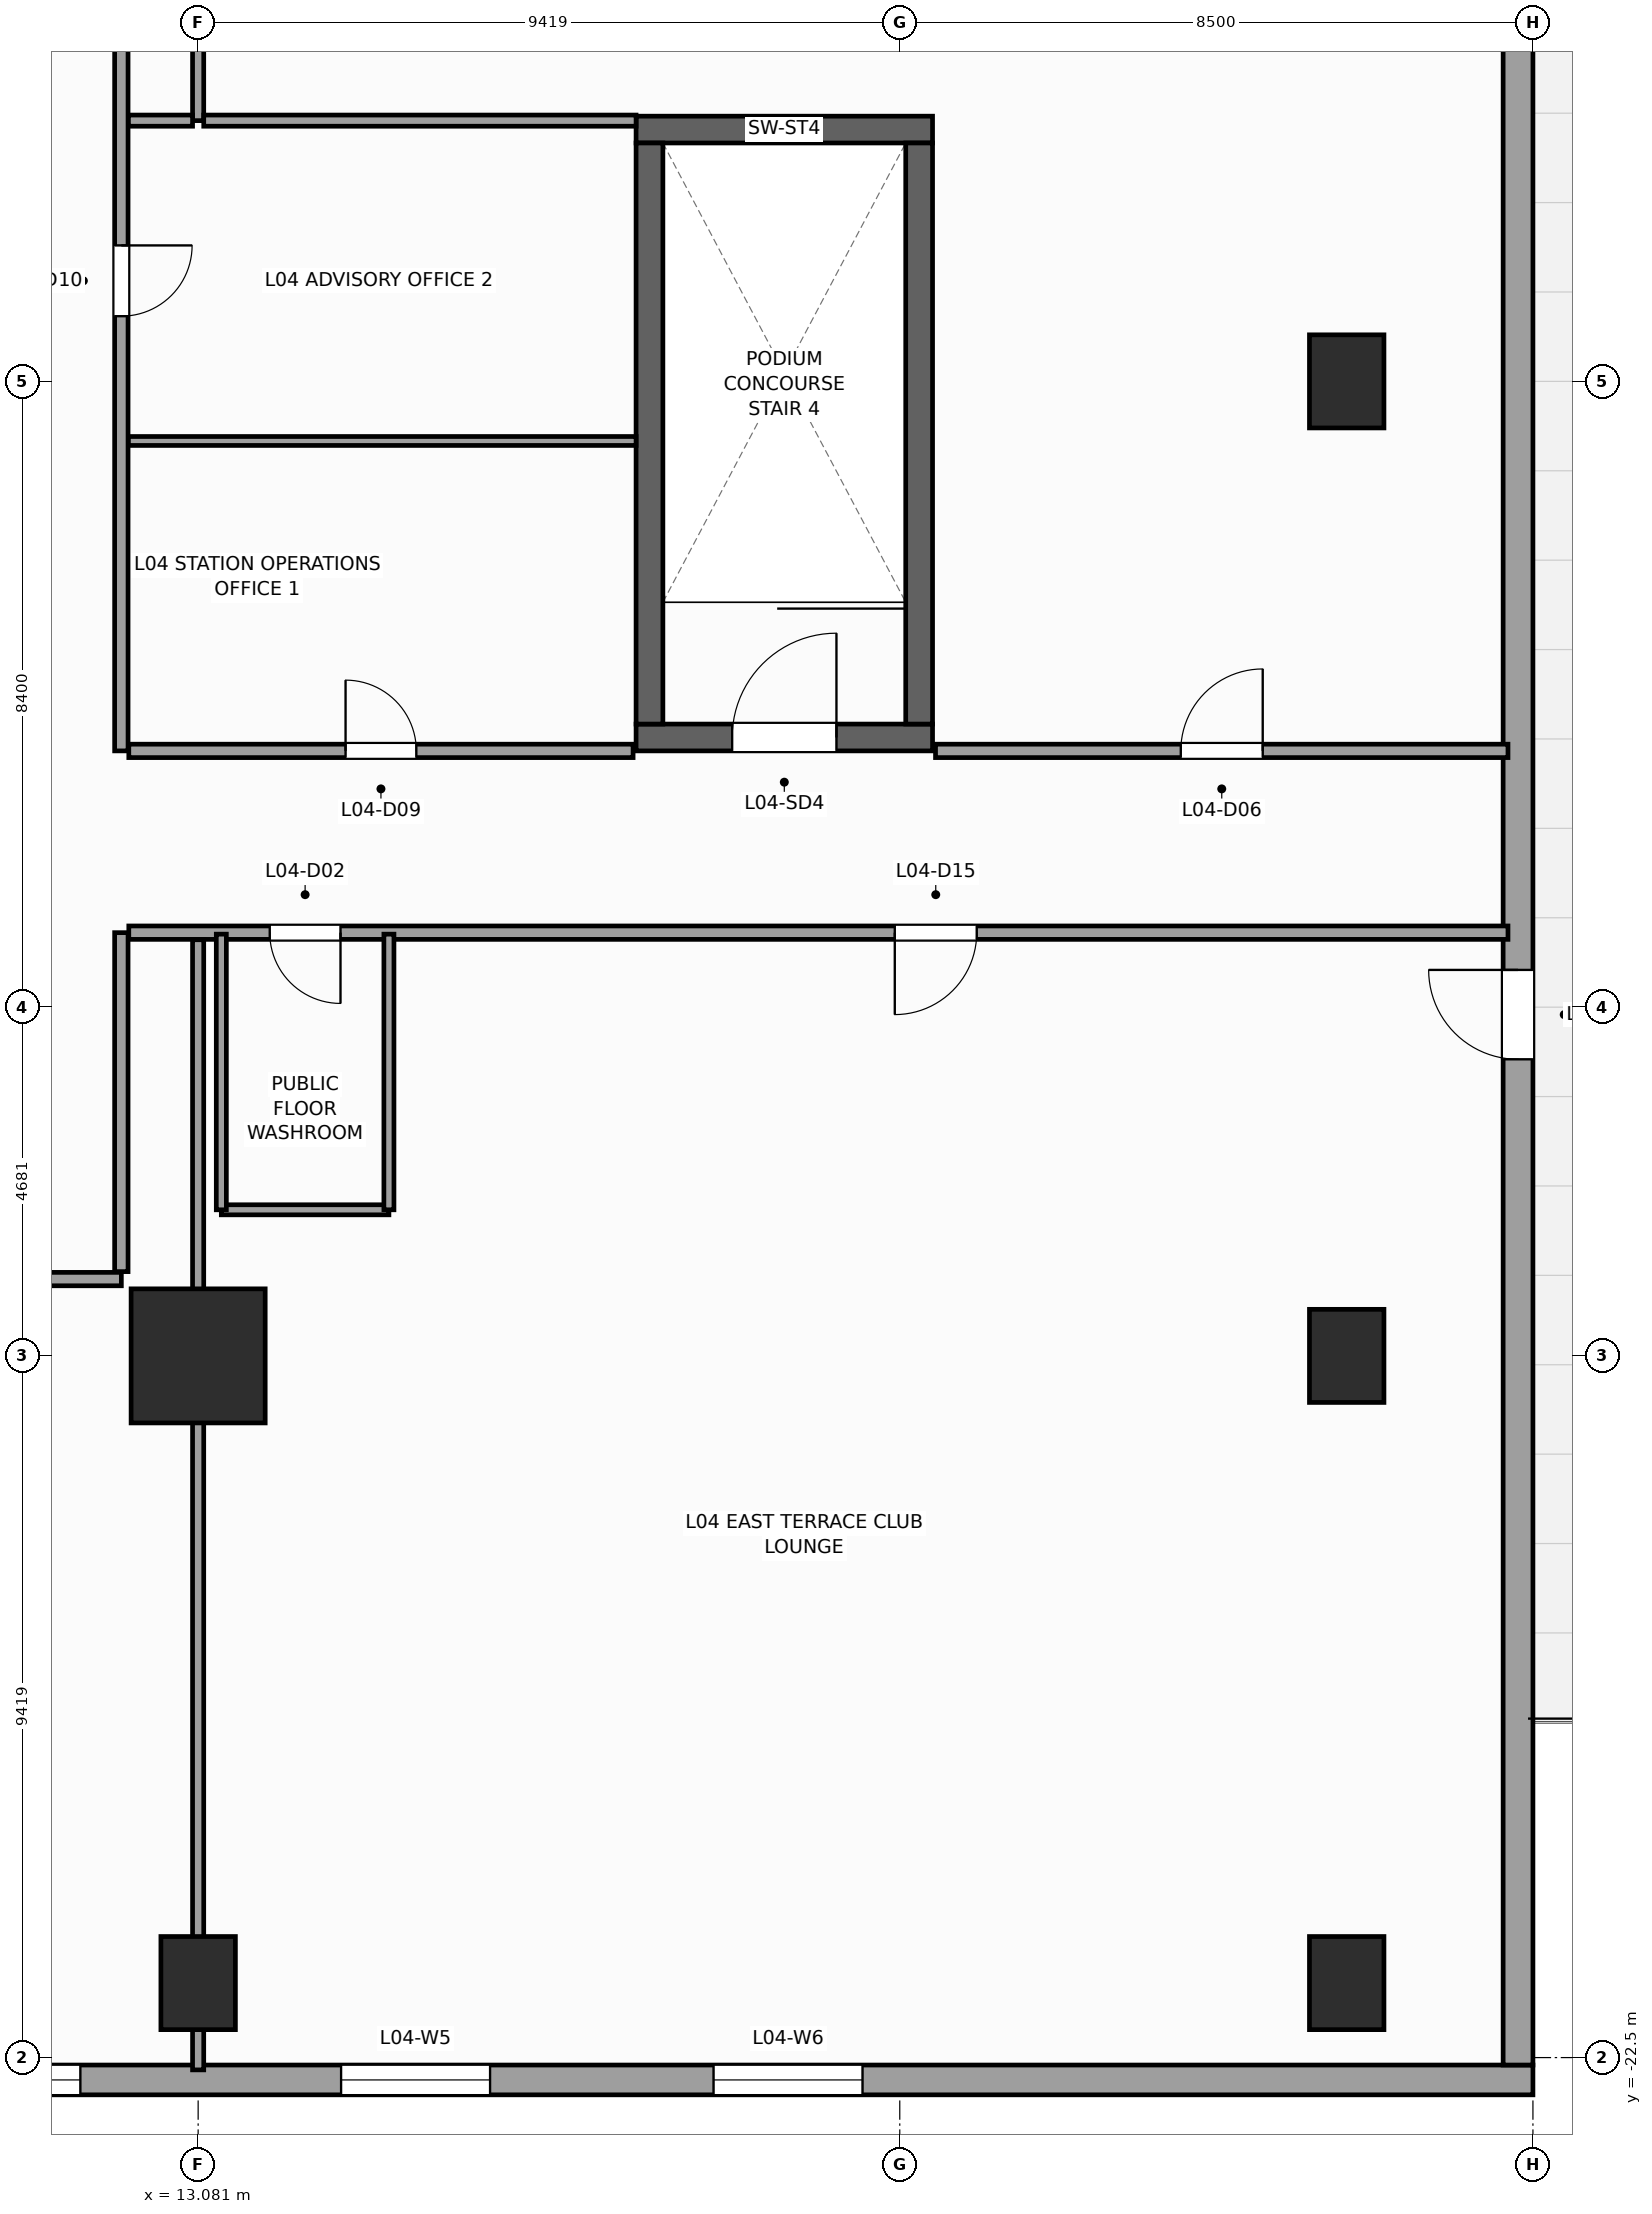
"""IFC4 building model, lengths in metres.
Left out: names, types, materials, properties, quantities, classifications, styles, units other than length and angle.
Written with IfcOpenShell. Run it as: python <this file> out.ifc"""

import sys

from ifc_helpers import new_model, si_unit, direction, frame, frame_2d, origin, origin_2d, place, context, subcontext, project, spatial, rectangle, extrude, source, transform, mapped, element, fill, save


model = new_model("IFC4")
c1 = context("Model", 3, precision=1e-05, world=origin(), true_north=direction((0.0, 1.0)))
c2 = subcontext(c1, "Body", "Model", "MODEL_VIEW")
j1 = project(units=[si_unit("LENGTHUNIT", "METRE"), si_unit("PLANEANGLEUNIT", "RADIAN")], contexts=[c1])
p1 = place(None, origin())
s1 = spatial("IfcSite", under=j1, at=p1, CompositionType="ELEMENT")
p2 = place(p1, origin())
s2 = spatial("IfcBuilding", under=s1, at=p2, CompositionType="ELEMENT")
p3 = place(p2, frame((0.0, 0.0, 21.0)))
s3 = spatial("IfcBuildingStorey", under=s2, at=p3, CompositionType="ELEMENT", Elevation=21.0)
p4 = place(p3, frame((18.96, -4.78, 0.0), z_axis=(0.0, 0.0, 1.0), x_axis=(1.0, 0.0, 0.0)))
e1 = element("IfcWall", 1, at=p4, inside=s3, PredefinedType="SHEAR", context=c2, shape_type="SweptSolid", body=[
    extrude(rectangle(XDim=3.98, YDim=0.36, at=frame_2d((1.99, 0.0))), origin(), (0.0, 0.0, 1.0), 5.0),
])
p5 = place(p4, frame((1.29, 0.0, 0.0)))
e2 = element("IfcOpeningElement", 2, at=p5, cuts=e1, PredefinedType="OPENING", context=c2, shape_type="SweptSolid", body=[
    extrude(rectangle(XDim=1.4, YDim=2.2, at=frame_2d((0.7, 1.1))), frame((0.0, 0.19, 0.0), z_axis=(0.0, -1.0, 0.0), x_axis=(1.0, 0.0, 0.0)), (0.0, 0.0, 1.0), 0.38),
])
p6 = place(p3, frame((18.96, 3.38, 0.0), z_axis=(0.0, 0.0, 1.0), x_axis=(1.0, 0.0, 0.0)))
e3 = element("IfcWall", 3, at=p6, inside=s3, PredefinedType="SHEAR", context=c2, shape_type="SweptSolid", body=[
    extrude(rectangle(XDim=3.98, YDim=0.36, at=frame_2d((1.99, 0.0))), origin(), (0.0, 0.0, 1.0), 5.0),
])
for number, where, z_axis, x_axis in (
    (4, (19.14, -4.6, 0.0), (0.0, 0.0, 1.0), (0.0, 1.0, 0.0)),
    (5, (22.76, -4.6, 0.0), (0.0, 0.0, 1.0), (0.0, 1.0, 0.0)),
):
    element("IfcWall", number, at=place(p3, frame(where, z_axis=z_axis, x_axis=x_axis)), inside=s3, PredefinedType="SHEAR", context=c2, shape_type="SweptSolid", body=[
        extrude(rectangle(XDim=7.8, YDim=0.36, at=frame_2d((3.9, 0.0))), origin(), (0.0, 0.0, 1.0), 5.0),
    ])
m1 = source(origin(), c2, "Body", "SweptSolid", [
    extrude(rectangle(XDim=1.8, YDim=1.8, at=origin_2d()), origin(), (0.0, 0.0, 1.0), 5.0),
])
p7 = place(p3, frame((13.081, -13.081, 0.0), z_axis=(0.0, 0.0, 1.0), x_axis=(1.0, 0.0, 0.0)))
e6 = element("IfcColumn", 6, at=p7, inside=s3, PredefinedType="COLUMN", context=c2, shape_type="MappedRepresentation", body=[
    mapped(m1, transform((0.0, 0.0, 0.0), scale=1.0)),
])
m2 = source(origin(), c2, "Body", "SweptSolid", [
    extrude(rectangle(XDim=1.0, YDim=1.25, at=origin_2d()), origin(), (0.0, 0.0, 1.0), 5.0),
])
for number, where, z_axis, x_axis in (
    (7, (13.081, -21.5, 0.0), (0.0, 0.0, 1.0), (1.0, 0.0, 0.0)),
    (8, (28.5, -21.5, 0.0), (0.0, 0.0, 1.0), (1.0, 0.0, 0.0)),
    (9, (28.5, -13.081, 0.0), (0.0, 0.0, 1.0), (1.0, 0.0, 0.0)),
    (10, (28.5, 0.0, 0.0), (0.0, 0.0, 1.0), (1.0, 0.0, 0.0)),
):
    element("IfcColumn", number, at=place(p3, frame(where, z_axis=z_axis, x_axis=x_axis)), inside=s3, PredefinedType="COLUMN", context=c2, shape_type="MappedRepresentation", body=[
        mapped(m2, transform((0.0, 0.0, 0.0), scale=1.0)),
    ])
p8 = place(p3, frame((0.0, -22.8, 0.0), z_axis=(0.0, 0.0, 1.0), x_axis=(1.0, 0.0, 0.0)))
e11 = element("IfcWall", 11, at=p8, inside=s3, PredefinedType="STANDARD", context=c2, shape_type="SweptSolid", body=[
    extrude(rectangle(XDim=31.0, YDim=0.4, at=frame_2d((15.5, 0.0))), origin(), (0.0, 0.0, 1.0), 4.72),
])
p9 = place(p8, frame((9.5, 0.0, 0.65)))
e12 = element("IfcOpeningElement", 12, at=p9, cuts=e11, PredefinedType="OPENING", context=c2, shape_type="SweptSolid", body=[
    extrude(rectangle(XDim=2.0, YDim=1.45, at=frame_2d((1.0, 0.725))), frame((0.0, 0.21, 0.0), z_axis=(0.0, -1.0, 0.0), x_axis=(1.0, 0.0, 0.0)), (0.0, 0.0, 1.0), 0.42),
])
p10 = place(p8, frame((15.0, 0.0, 0.65)))
e13 = element("IfcOpeningElement", 13, at=p10, cuts=e11, PredefinedType="OPENING", context=c2, shape_type="SweptSolid", body=[
    extrude(rectangle(XDim=2.0, YDim=1.45, at=frame_2d((1.0, 0.725))), frame((0.0, 0.21, 0.0), z_axis=(0.0, -1.0, 0.0), x_axis=(1.0, 0.0, 0.0)), (0.0, 0.0, 1.0), 0.42),
])
p11 = place(p8, frame((20.0, 0.0, 0.65)))
e14 = element("IfcOpeningElement", 14, at=p11, cuts=e11, PredefinedType="OPENING", context=c2, shape_type="SweptSolid", body=[
    extrude(rectangle(XDim=2.0, YDim=1.45, at=frame_2d((1.0, 0.725))), frame((0.0, 0.21, 0.0), z_axis=(0.0, -1.0, 0.0), x_axis=(1.0, 0.0, 0.0)), (0.0, 0.0, 1.0), 0.42),
])
p12 = place(p3, frame((30.8, -22.6, 0.0), z_axis=(0.0, 0.0, 1.0), x_axis=(0.0, 1.0, 0.0)))
e15 = element("IfcWall", 15, at=p12, inside=s3, PredefinedType="STANDARD", context=c2, shape_type="SweptSolid", body=[
    extrude(rectangle(XDim=45.2, YDim=0.4, at=frame_2d((22.6, 0.0))), origin(), (0.0, 0.0, 1.0), 4.72),
])
p13 = place(p12, frame((13.5, 0.0, 0.0)))
e16 = element("IfcOpeningElement", 16, at=p13, cuts=e15, PredefinedType="OPENING", context=c2, shape_type="SweptSolid", body=[
    extrude(rectangle(XDim=1.2, YDim=2.3, at=frame_2d((0.6, 1.15))), frame((0.0, 0.21, 0.0), z_axis=(0.0, -1.0, 0.0), x_axis=(1.0, 0.0, 0.0)), (0.0, 0.0, 1.0), 0.42),
])
p14 = place(p3, frame((4.1, -12.05, 0.0), z_axis=(0.0, 0.0, 1.0), x_axis=(1.0, 0.0, 0.0)))
e17 = element("IfcWall", 17, at=p14, inside=s3, PredefinedType="PARTITIONING", context=c2, shape_type="SweptSolid", body=[
    extrude(rectangle(XDim=7.95, YDim=0.18, at=frame_2d((3.975, 0.0))), origin(), (0.0, 0.0, 1.0), 4.72),
])
p15 = place(p3, frame((12.05, -11.95, 0.0), z_axis=(0.0, 0.0, 1.0), x_axis=(0.0, 1.0, 0.0)))
e18 = element("IfcWall", 18, at=p15, inside=s3, PredefinedType="PARTITIONING", context=c2, shape_type="SweptSolid", body=[
    extrude(rectangle(XDim=4.55, YDim=0.18, at=frame_2d((2.275, 0.0))), origin(), (0.0, 0.0, 1.0), 4.72),
])
p16 = place(p3, frame((12.05, -4.96, 0.0), z_axis=(0.0, 0.0, 1.0), x_axis=(0.0, 1.0, 0.0)))
e19 = element("IfcWall", 19, at=p16, inside=s3, PredefinedType="PARTITIONING", context=c2, shape_type="SweptSolid", body=[
    extrude(rectangle(XDim=16.91, YDim=0.18, at=frame_2d((8.455, 0.0))), origin(), (0.0, 0.0, 1.0), 4.72),
])
p17 = place(p16, frame((5.835, 0.0, 0.0)))
e20 = element("IfcOpeningElement", 20, at=p17, cuts=e19, PredefinedType="OPENING", context=c2, shape_type="SweptSolid", body=[
    extrude(rectangle(XDim=0.95, YDim=2.15, at=frame_2d((0.475, 1.075))), frame((0.0, 0.1, 0.0), z_axis=(0.0, -1.0, 0.0), x_axis=(1.0, 0.0, 0.0)), (0.0, 0.0, 1.0), 0.2),
])
p18 = place(p3, frame((12.15, -7.4, 0.0), z_axis=(0.0, 0.0, 1.0), x_axis=(1.0, 0.0, 0.0)))
e21 = element("IfcWall", 21, at=p18, inside=s3, PredefinedType="PARTITIONING", context=c2, shape_type="SweptSolid", body=[
    extrude(rectangle(XDim=18.515, YDim=0.18, at=frame_2d((9.258, 0.0))), origin(), (0.0, 0.0, 1.0), 4.72),
])
p19 = place(p18, frame((1.892, 0.0, 0.0)))
e22 = element("IfcOpeningElement", 22, at=p19, cuts=e21, PredefinedType="OPENING", context=c2, shape_type="SweptSolid", body=[
    extrude(rectangle(XDim=0.95, YDim=2.1, at=frame_2d((0.475, 1.05))), frame((0.0, 0.1, 0.0), z_axis=(0.0, -1.0, 0.0), x_axis=(1.0, 0.0, 0.0)), (0.0, 0.0, 1.0), 0.2),
])
p20 = place(p18, frame((10.283, 0.0, 0.0)))
e23 = element("IfcOpeningElement", 23, at=p20, cuts=e21, PredefinedType="OPENING", context=c2, shape_type="SweptSolid", body=[
    extrude(rectangle(XDim=1.1, YDim=2.2, at=frame_2d((0.55, 1.1))), frame((0.0, 0.1, 0.0), z_axis=(0.0, -1.0, 0.0), x_axis=(1.0, 0.0, 0.0)), (0.0, 0.0, 1.0), 0.2),
])
p21 = place(p3, frame((12.15, -4.96, 0.0), z_axis=(0.0, 0.0, 1.0), x_axis=(1.0, 0.0, 0.0)))
e24 = element("IfcWall", 24, at=p21, inside=s3, PredefinedType="PARTITIONING", context=c2, shape_type="SweptSolid", body=[
    extrude(rectangle(XDim=6.77, YDim=0.18, at=frame_2d((3.385, 0.0))), origin(), (0.0, 0.0, 1.0), 4.72),
])
p22 = place(p21, frame((2.91, 0.0, 0.0)))
e25 = element("IfcOpeningElement", 25, at=p22, cuts=e24, PredefinedType="OPENING", context=c2, shape_type="SweptSolid", body=[
    extrude(rectangle(XDim=0.95, YDim=2.15, at=frame_2d((0.475, 1.075))), frame((0.0, 0.1, 0.0), z_axis=(0.0, -1.0, 0.0), x_axis=(1.0, 0.0, 0.0)), (0.0, 0.0, 1.0), 0.2),
])
p23 = place(p3, frame((22.98, -4.96, 0.0), z_axis=(0.0, 0.0, 1.0), x_axis=(1.0, 0.0, 0.0)))
e26 = element("IfcWall", 26, at=p23, inside=s3, PredefinedType="PARTITIONING", context=c2, shape_type="SweptSolid", body=[
    extrude(rectangle(XDim=7.685, YDim=0.18, at=frame_2d((3.843, 0.0))), origin(), (0.0, 0.0, 1.0), 4.72),
])
p24 = place(p23, frame((3.292, 0.0, 0.0)))
e27 = element("IfcOpeningElement", 27, at=p24, cuts=e26, PredefinedType="OPENING", context=c2, shape_type="SweptSolid", body=[
    extrude(rectangle(XDim=1.1, YDim=2.2, at=frame_2d((0.55, 1.1))), frame((0.0, 0.1, 0.0), z_axis=(0.0, -1.0, 0.0), x_axis=(1.0, 0.0, 0.0)), (0.0, 0.0, 1.0), 0.2),
])
p25 = place(p3, frame((13.081, 3.5, 0.0), z_axis=(0.0, 0.0, 1.0), x_axis=(0.0, 1.0, 0.0)))
e28 = element("IfcWall", 28, at=p25, inside=s3, PredefinedType="PARTITIONING", context=c2, shape_type="SweptSolid", body=[
    extrude(rectangle(XDim=19.165, YDim=0.15, at=frame_2d((9.583, 0.0))), origin(), (0.0, 0.0, 1.0), 2.88),
])
p26 = place(p3, frame((12.145, 3.5, 0.0), z_axis=(0.0, 0.0, 1.0), x_axis=(1.0, 0.0, 0.0)))
e29 = element("IfcWall", 29, at=p26, inside=s3, PredefinedType="PARTITIONING", context=c2, shape_type="SweptSolid", body=[
    extrude(rectangle(XDim=0.861, YDim=0.15, at=frame_2d((0.431, 0.0))), origin(), (0.0, 0.0, 1.0), 4.72),
])
p27 = place(p3, frame((13.156, 3.5, 0.0), z_axis=(0.0, 0.0, 1.0), x_axis=(1.0, 0.0, 0.0)))
e30 = element("IfcWall", 30, at=p27, inside=s3, PredefinedType="PARTITIONING", context=c2, shape_type="SweptSolid", body=[
    extrude(rectangle(XDim=5.804, YDim=0.15, at=frame_2d((2.902, 0.0))), origin(), (0.0, 0.0, 1.0), 4.72),
])
p28 = place(p3, frame((12.145, -0.8, 0.0), z_axis=(0.0, 0.0, 1.0), x_axis=(1.0, 0.0, 0.0)))
e31 = element("IfcWall", 31, at=p28, inside=s3, PredefinedType="PARTITIONING", context=c2, shape_type="SweptSolid", body=[
    extrude(rectangle(XDim=6.815, YDim=0.12, at=frame_2d((3.407, 0.0))), origin(), (0.0, 0.0, 1.0), 2.75),
])
p29 = place(p3, frame((13.081, -22.665, 0.0), z_axis=(0.0, 0.0, 1.0), x_axis=(0.0, 1.0, 0.0)))
e32 = element("IfcWall", 32, at=p29, inside=s3, PredefinedType="PARTITIONING", context=c2, shape_type="SweptSolid", body=[
    extrude(rectangle(XDim=15.17, YDim=0.15, at=frame_2d((7.585, 0.0))), origin(), (0.0, 0.0, 1.0), 2.88),
])
p30 = place(p3, frame((13.392, -11.12, 0.0), z_axis=(0.0, 0.0, 1.0), x_axis=(1.0, 0.0, 0.0)))
e33 = element("IfcWall", 33, at=p30, inside=s3, PredefinedType="PARTITIONING", context=c2, shape_type="SweptSolid", body=[
    extrude(rectangle(XDim=2.25, YDim=0.135, at=frame_2d((1.125, 0.0))), origin(), (0.0, 0.0, 1.0), 4.72),
])
p31 = place(p3, frame((15.642, -11.12, 0.0), z_axis=(0.0, 0.0, 1.0), x_axis=(0.0, 1.0, 0.0)))
e34 = element("IfcWall", 34, at=p31, inside=s3, PredefinedType="PARTITIONING", context=c2, shape_type="SweptSolid", body=[
    extrude(rectangle(XDim=3.7, YDim=0.135, at=frame_2d((1.85, 0.0))), origin(), (0.0, 0.0, 1.0), 4.72),
])
p32 = place(p3, frame((13.392, -11.12, 0.0), z_axis=(0.0, 0.0, 1.0), x_axis=(0.0, 1.0, 0.0)))
e35 = element("IfcWall", 35, at=p32, inside=s3, PredefinedType="PARTITIONING", context=c2, shape_type="SweptSolid", body=[
    extrude(rectangle(XDim=3.7, YDim=0.135, at=frame_2d((1.85, 0.0))), origin(), (0.0, 0.0, 1.0), 3.56),
])
m3 = source(origin(), c2, "Body", "SweptSolid", [
    extrude(rectangle(XDim=2.0, YDim=1.45, at=frame_2d((1.0, 0.725))), frame((0.0, 0.03, 0.0), z_axis=(0.0, -1.0, 0.0), x_axis=(1.0, 0.0, 0.0)), (0.0, 0.0, 1.0), 0.06),
])
p33 = place(p9, origin())
e36 = element("IfcWindow", 36, at=p33, inside=s3, PartitioningType="SINGLE_PANEL", PredefinedType="WINDOW", context=c2, shape_type="MappedRepresentation", body=[
    mapped(m3, transform((0.0, 0.0, 0.0), scale=1.0)),
])
fill(e12, e36)
p34 = place(p10, origin())
e37 = element("IfcWindow", 37, at=p34, inside=s3, PartitioningType="SINGLE_PANEL", PredefinedType="WINDOW", context=c2, shape_type="MappedRepresentation", body=[
    mapped(m3, transform((0.0, 0.0, 0.0), scale=1.0)),
])
fill(e13, e37)
p35 = place(p11, origin())
e38 = element("IfcWindow", 38, at=p35, inside=s3, PartitioningType="SINGLE_PANEL", PredefinedType="WINDOW", context=c2, shape_type="MappedRepresentation", body=[
    mapped(m3, transform((0.0, 0.0, 0.0), scale=1.0)),
])
fill(e14, e38)
m4 = source(origin(), c2, "Body", "SweptSolid", [
    extrude(rectangle(XDim=1.2, YDim=2.3, at=frame_2d((0.6, 1.15))), frame((0.0, 0.025, 0.0), z_axis=(0.0, -1.0, 0.0), x_axis=(1.0, 0.0, 0.0)), (0.0, 0.0, 1.0), 0.05),
])
p36 = place(p13, origin())
e39 = element("IfcDoor", 39, at=p36, inside=s3, OperationType="SINGLE_SWING_RIGHT", PredefinedType="DOOR", context=c2, shape_type="MappedRepresentation", body=[
    mapped(m4, transform((0.0, 0.0, 0.0), scale=1.0)),
])
fill(e16, e39)
m5 = source(origin(), c2, "Body", "SweptSolid", [
    extrude(rectangle(XDim=1.4, YDim=2.2, at=frame_2d((0.7, 1.1))), frame((0.0, 0.025, 0.0), z_axis=(0.0, -1.0, 0.0), x_axis=(1.0, 0.0, 0.0)), (0.0, 0.0, 1.0), 0.05),
])
p37 = place(p5, origin())
e40 = element("IfcDoor", 40, at=p37, inside=s3, OperationType="SINGLE_SWING_RIGHT", PredefinedType="DOOR", context=c2, shape_type="MappedRepresentation", body=[
    mapped(m5, transform((0.0, 0.0, 0.0), scale=1.0)),
])
fill(e2, e40)
m6 = source(origin(), c2, "Body", "SweptSolid", [
    extrude(rectangle(XDim=0.95, YDim=2.1, at=frame_2d((0.475, 1.05))), frame((0.0, 0.025, 0.0), z_axis=(0.0, -1.0, 0.0), x_axis=(1.0, 0.0, 0.0)), (0.0, 0.0, 1.0), 0.05),
])
p38 = place(p19, frame((0.95, 0.0, 0.0), z_axis=(0.0, 0.0, 1.0), x_axis=(-1.0, 0.0, 0.0)))
e41 = element("IfcDoor", 41, at=p38, inside=s3, OperationType="SINGLE_SWING_RIGHT", PredefinedType="DOOR", context=c2, shape_type="MappedRepresentation", body=[
    mapped(m6, transform((0.0, 0.0, 0.0), scale=1.0)),
])
fill(e22, e41)
m7 = source(origin(), c2, "Body", "SweptSolid", [
    extrude(rectangle(XDim=1.1, YDim=2.2, at=frame_2d((0.55, 1.1))), frame((0.0, 0.025, 0.0), z_axis=(0.0, -1.0, 0.0), x_axis=(1.0, 0.0, 0.0)), (0.0, 0.0, 1.0), 0.05),
])
p39 = place(p24, origin())
e42 = element("IfcDoor", 42, at=p39, inside=s3, OperationType="SINGLE_SWING_RIGHT", PredefinedType="DOOR", context=c2, shape_type="MappedRepresentation", body=[
    mapped(m7, transform((0.0, 0.0, 0.0), scale=1.0)),
])
fill(e27, e42)
m8 = source(origin(), c2, "Body", "SweptSolid", [
    extrude(rectangle(XDim=0.95, YDim=2.15, at=frame_2d((0.475, 1.075))), frame((0.0, 0.025, 0.0), z_axis=(0.0, -1.0, 0.0), x_axis=(1.0, 0.0, 0.0)), (0.0, 0.0, 1.0), 0.05),
])
p40 = place(p22, origin())
e43 = element("IfcDoor", 43, at=p40, inside=s3, OperationType="SINGLE_SWING_LEFT", PredefinedType="DOOR", context=c2, shape_type="MappedRepresentation", body=[
    mapped(m8, transform((0.0, 0.0, 0.0), scale=1.0)),
])
fill(e25, e43)
p41 = place(p17, frame((0.95, 0.0, 0.0), z_axis=(0.0, 0.0, 1.0), x_axis=(-1.0, 0.0, 0.0)))
e44 = element("IfcDoor", 44, at=p41, inside=s3, OperationType="SINGLE_SWING_RIGHT", PredefinedType="DOOR", context=c2, shape_type="MappedRepresentation", body=[
    mapped(m8, transform((0.0, 0.0, 0.0), scale=1.0)),
])
fill(e20, e44)
p42 = place(p20, frame((1.1, 0.0, 0.0), z_axis=(0.0, 0.0, 1.0), x_axis=(-1.0, 0.0, 0.0)))
e45 = element("IfcDoor", 45, at=p42, inside=s3, OperationType="SINGLE_SWING_LEFT", PredefinedType="DOOR", context=c2, shape_type="MappedRepresentation", body=[
    mapped(m7, transform((0.0, 0.0, 0.0), scale=1.0)),
])
fill(e23, e45)
save(model, sys.argv[1])
